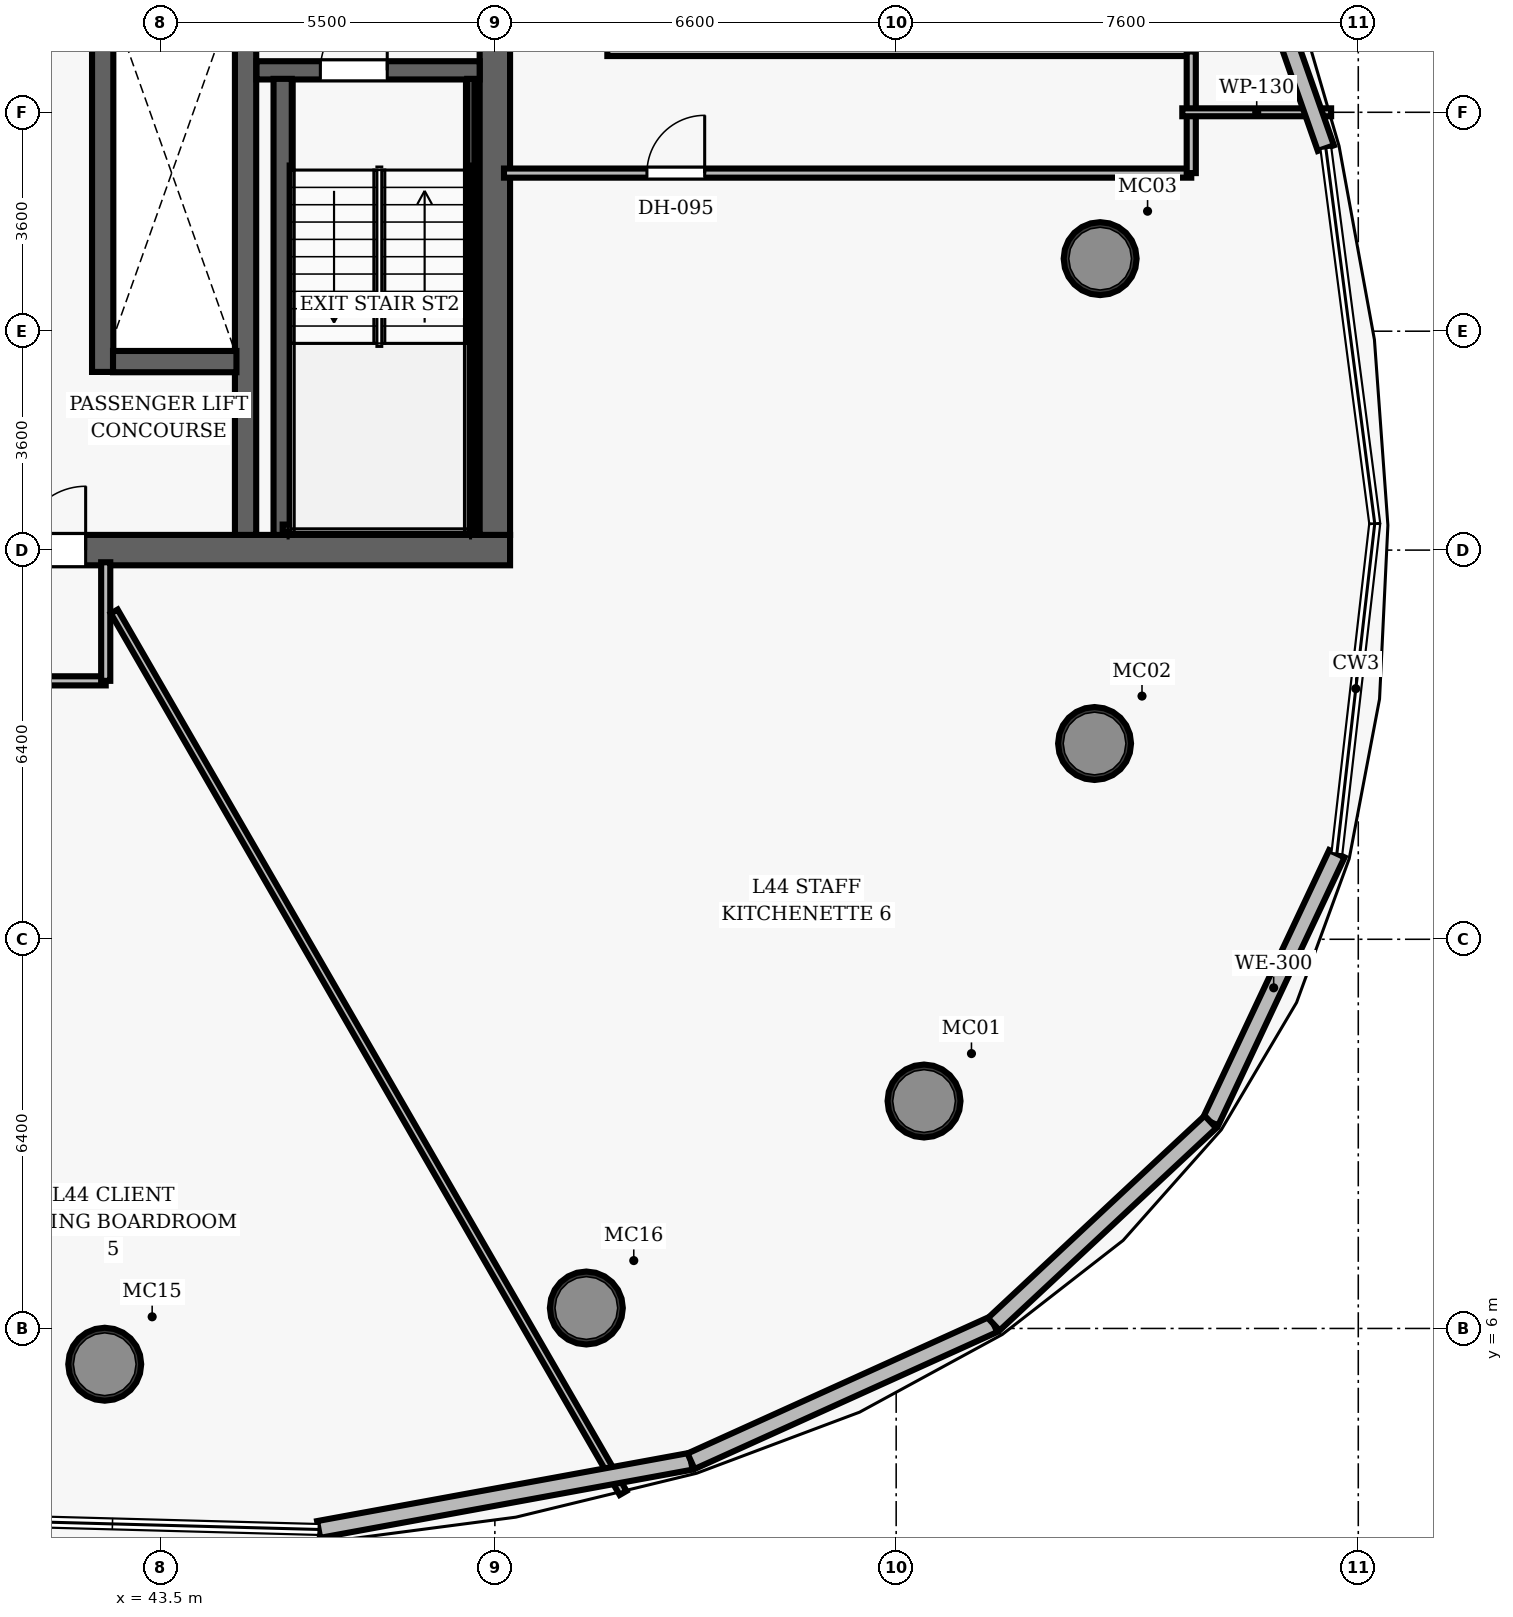
"""IFC4 building model, lengths in metres.
Left out: names, types, materials, properties, quantities, classifications, styles, units other than length and angle.
Written with IfcOpenShell. Run it as: python <this file> out.ifc"""

import sys

from ifc_helpers import new_model, si_unit, direction, frame, frame_2d, origin, origin_2d, place, context, subcontext, project, spatial, rectangle, hollow_circle, extrude, element, fill, save


model = new_model("IFC4")
c1 = context("Model", 3, precision=1e-05, world=origin(), true_north=direction((0.0, 1.0)))
c2 = subcontext(c1, "Body", "Model", "MODEL_VIEW")
j1 = project(units=[si_unit("LENGTHUNIT", "METRE"), si_unit("PLANEANGLEUNIT", "RADIAN")], contexts=[c1])
p1 = place(None, origin())
s1 = spatial("IfcSite", under=j1, at=p1, CompositionType="ELEMENT")
p2 = place(p1, origin())
s2 = spatial("IfcBuilding", under=s1, at=p2, CompositionType="ELEMENT")
p3 = place(p2, frame((0.0, 0.0, 175.05)))
s3 = spatial("IfcBuildingStorey", under=s2, at=p3, CompositionType="ELEMENT", Elevation=175.05)
p4 = place(p3, frame((26.75, 18.8, 0.0), z_axis=(0.0, 0.0, 1.0), x_axis=(1.0, 0.0, 0.0)))
e1 = element("IfcWall", 1, at=p4, inside=s3, PredefinedType="SHEAR", context=c2, shape_type="SweptSolid", body=[
    extrude(rectangle(XDim=22.5, YDim=0.5, at=frame_2d((11.25, 0.0))), origin(), (0.0, 0.0, 1.0), 3.85),
])
p5 = place(p4, frame((14.47, 0.0, 0.0)))
e2 = element("IfcOpeningElement", 2, at=p5, cuts=e1, PredefinedType="OPENING", context=c2, shape_type="SweptSolid", body=[
    extrude(rectangle(XDim=1.05, YDim=2.15, at=frame_2d((0.525, 1.075))), frame((0.0, 0.26, 0.0), z_axis=(0.0, -1.0, 0.0), x_axis=(1.0, 0.0, 0.0)), (0.0, 0.0, 1.0), 0.52),
])
p6 = place(p3, frame((49.0, 19.05, 0.0), z_axis=(0.0, 0.0, 1.0), x_axis=(0.0, 1.0, 0.0)))
e3 = element("IfcWall", 3, at=p6, inside=s3, PredefinedType="SHEAR", context=c2, shape_type="SweptSolid", body=[
    extrude(rectangle(XDim=13.9, YDim=0.5, at=frame_2d((6.95, 0.0))), origin(), (0.0, 0.0, 1.0), 3.85),
])
p7 = place(p6, frame((8.2, 0.0, 0.0)))
e4 = element("IfcOpeningElement", 4, at=p7, cuts=e3, PredefinedType="OPENING", context=c2, shape_type="SweptSolid", body=[
    extrude(rectangle(XDim=1.05, YDim=2.15, at=frame_2d((0.525, 1.075))), frame((0.0, 0.26, 0.0), z_axis=(0.0, -1.0, 0.0), x_axis=(1.0, 0.0, 0.0)), (0.0, 0.0, 1.0), 0.52),
])
p8 = place(p3, frame((44.9, 19.05, 0.0), z_axis=(0.0, 0.0, 1.0), x_axis=(0.0, 1.0, 0.0)))
e5 = element("IfcWall", 5, at=p8, inside=s3, PredefinedType="SHEAR", context=c2, shape_type="SweptSolid", body=[
    extrude(rectangle(XDim=13.9, YDim=0.35, at=frame_2d((6.95, 0.0))), origin(), (0.0, 0.0, 1.0), 3.85),
])
for number, where, z_axis, x_axis in (
    (6, (56.058, 9.74, 0.0), (0.0, 0.0, 1.0), (1.0, 0.0, 0.0)),
    (7, (58.863, 15.619, 0.0), (0.0, 0.0, 1.0), (1.0, 0.0, 0.0)),
    (8, (58.955, 23.594, 0.0), (0.0, 0.0, 1.0), (1.0, 0.0, 0.0)),
    (9, (42.584, 5.412, 0.0), (0.0, 0.0, 1.0), (1.0, 0.0, 0.0)),
    (10, (50.504, 6.336, 0.0), (0.0, 0.0, 1.0), (1.0, 0.0, 0.0)),
):
    element("IfcColumn", number, at=place(p3, frame(where, z_axis=z_axis, x_axis=x_axis)), inside=s3, PredefinedType="COLUMN", context=c2, shape_type="SweptSolid", body=[
        extrude(hollow_circle(Radius=0.6, WallThickness=0.05, at=origin_2d()), origin(), (0.0, 0.0, 1.0), 3.85),
    ])
p9 = place(p3, frame((45.08, 26.69, 0.0), z_axis=(0.0, 0.0, 1.0), x_axis=(1.0, 0.0, 0.0)))
e11 = element("IfcWall", 11, at=p9, inside=s3, PredefinedType="SHEAR", context=c2, shape_type="SweptSolid", body=[
    extrude(rectangle(XDim=3.67, YDim=0.3, at=frame_2d((1.835, 0.0))), origin(), (0.0, 0.0, 1.0), 3.85),
])
p10 = place(p9, frame((1.05, 0.0, 0.0)))
e12 = element("IfcOpeningElement", 12, at=p10, cuts=e11, PredefinedType="OPENING", context=c2, shape_type="SweptSolid", body=[
    extrude(rectangle(XDim=1.1, YDim=2.15, at=frame_2d((0.55, 1.075))), frame((0.0, 0.16, 0.0), z_axis=(0.0, -1.0, 0.0), x_axis=(1.0, 0.0, 0.0)), (0.0, 0.0, 1.0), 0.32),
])
p11 = place(p3, frame((45.51, 19.05, 0.0), z_axis=(0.0, 0.0, 1.0), x_axis=(0.0, 1.0, 0.0)))
e13 = element("IfcWall", 13, at=p11, inside=s3, PredefinedType="SHEAR", context=c2, shape_type="SweptSolid", body=[
    extrude(rectangle(XDim=7.5, YDim=0.3, at=frame_2d((3.75, 0.0))), origin(), (0.0, 0.0, 1.0), 3.85),
])
p12 = place(p3, frame((48.605, 19.1, 0.0), z_axis=(0.0, 0.0, 1.0), x_axis=(0.0, 1.0, 0.0)))
e14 = element("IfcWall", 14, at=p12, inside=s3, PredefinedType="SHEAR", context=c2, shape_type="SweptSolid", body=[
    extrude(rectangle(XDim=7.45, YDim=0.12, at=frame_2d((3.725, 0.0))), origin(), (0.0, 0.0, 1.0), 3.85),
])
p13 = place(p3, frame((45.51, 19.16, 0.0), z_axis=(0.0, 0.0, 1.0), x_axis=(1.0, 0.0, 0.0)))
e15 = element("IfcWall", 15, at=p13, inside=s3, PredefinedType="SHEAR", context=c2, shape_type="SweptSolid", body=[
    extrude(rectangle(XDim=3.095, YDim=0.12, at=frame_2d((1.547, 0.0))), origin(), (0.0, 0.0, 1.0), 3.85),
])
p14 = place(p3, frame((42.55, 21.73, 0.0), z_axis=(0.0, 0.0, 1.0), x_axis=(0.0, 1.0, 0.0)))
e16 = element("IfcWall", 16, at=p14, inside=s3, PredefinedType="SHEAR", context=c2, shape_type="SweptSolid", body=[
    extrude(rectangle(XDim=6.54, YDim=0.35, at=frame_2d((3.27, 0.0))), origin(), (0.0, 0.0, 1.0), 3.035),
])
p15 = place(p3, frame((42.72, 21.9, 0.0), z_axis=(0.0, 0.0, 1.0), x_axis=(1.0, 0.0, 0.0)))
e17 = element("IfcWall", 17, at=p15, inside=s3, PredefinedType="SHEAR", context=c2, shape_type="SweptSolid", body=[
    extrude(rectangle(XDim=2.03, YDim=0.35, at=frame_2d((1.015, 0.0))), origin(), (0.0, 0.0, 1.0), 3.035),
])
p16 = place(p3, frame((50.85, 27.0, 0.0), z_axis=(0.0, 0.0, 1.0), x_axis=(1.0, 0.0, 0.0)))
e18 = element("IfcWall", 18, at=p16, inside=s3, PredefinedType="PARTITIONING", context=c2, shape_type="SweptSolid", body=[
    extrude(rectangle(XDim=9.603, YDim=0.15, at=frame_2d((4.802, 0.0))), origin(), (0.0, 0.0, 1.0), 3.035),
])
p17 = place(p3, frame((49.15, 25.0, 0.0), z_axis=(0.0, 0.0, 1.0), x_axis=(1.0, 0.0, 0.0)))
e19 = element("IfcWall", 19, at=p17, inside=s3, PredefinedType="PARTITIONING", context=c2, shape_type="SweptSolid", body=[
    extrude(rectangle(XDim=11.303, YDim=0.15, at=frame_2d((5.652, 0.0))), origin(), (0.0, 0.0, 1.0), 3.035),
])
p18 = place(p17, frame((2.351, 0.0, 0.0)))
e20 = element("IfcOpeningElement", 20, at=p18, cuts=e19, PredefinedType="OPENING", context=c2, shape_type="SweptSolid", body=[
    extrude(rectangle(XDim=0.95, YDim=2.15, at=frame_2d((0.475, 1.075))), frame((0.0, 0.085, 0.0), z_axis=(0.0, -1.0, 0.0), x_axis=(1.0, 0.0, 0.0)), (0.0, 0.0, 1.0), 0.17),
])
p19 = place(p3, frame((60.453, 25.0, 0.0), z_axis=(0.0, 0.0, 1.0), x_axis=(0.0, 1.0, 0.0)))
e21 = element("IfcWall", 21, at=p19, inside=s3, PredefinedType="PARTITIONING", context=c2, shape_type="SweptSolid", body=[
    extrude(rectangle(XDim=2.0, YDim=0.15, at=frame_2d((1.0, 0.0))), origin(), (0.0, 0.0, 1.0), 3.035),
])
p20 = place(p3, frame((39.05, 16.65, 0.0), z_axis=(0.0, 0.0, 1.0), x_axis=(1.0, 0.0, 0.0)))
e22 = element("IfcWall", 22, at=p20, inside=s3, PredefinedType="PARTITIONING", context=c2, shape_type="SweptSolid", body=[
    extrude(rectangle(XDim=3.55, YDim=0.15, at=frame_2d((1.775, 0.0))), origin(), (0.0, 0.0, 1.0), 3.035),
])
p21 = place(p3, frame((42.6, 16.65, 0.0), z_axis=(0.0, 0.0, 1.0), x_axis=(0.0, 1.0, 0.0)))
e23 = element("IfcWall", 23, at=p21, inside=s3, PredefinedType="PARTITIONING", context=c2, shape_type="SweptSolid", body=[
    extrude(rectangle(XDim=1.95, YDim=0.15, at=frame_2d((0.975, 0.0))), origin(), (0.0, 0.0, 1.0), 3.035),
])
p22 = place(p3, frame((60.306, 26.0, 0.0), z_axis=(0.0, 0.0, 1.0), x_axis=(1.0, 0.0, 0.0)))
e24 = element("IfcWall", 24, at=p22, inside=s3, PredefinedType="PARTITIONING", context=c2, shape_type="SweptSolid", body=[
    extrude(rectangle(XDim=2.448, YDim=0.13, at=frame_2d((1.224, 0.0))), origin(), (0.0, 0.0, 1.0), 3.035),
])
p23 = place(p3, frame((42.74, 17.79, 0.0), z_axis=(0.0, 0.0, 1.0), x_axis=(0.4999998082, -0.86602551452, 0.0)))
e25 = element("IfcWall", 25, at=p23, inside=s3, PredefinedType="PARTITIONING", context=c2, shape_type="SweptSolid", body=[
    extrude(rectangle(XDim=16.738, YDim=0.13, at=frame_2d((8.369, 0.0))), origin(), (0.0, 0.0, 1.0), 3.035),
])
p24 = place(p3, frame((62.848, 13.807, 0.0), z_axis=(0.0, 0.0, 1.0), x_axis=(-0.426284044229, -0.904589361885, 0.0)))
e26 = element("IfcWall", 26, at=p24, inside=s3, PredefinedType="SOLIDWALL", context=c2, shape_type="SweptSolid", body=[
    extrude(rectangle(XDim=4.876, YDim=0.28, at=frame_2d((2.438, 0.0))), origin(), (0.0, 0.0, 1.0), 3.62),
])
p25 = place(p3, frame((60.419, 31.812, 0.0), z_axis=(0.0, 0.0, 1.0), x_axis=(0.331279949487, -0.94353250875, 0.0)))
e27 = element("IfcWall", 27, at=p25, inside=s3, PredefinedType="SOLIDWALL", context=c2, shape_type="SweptSolid", body=[
    extrude(rectangle(XDim=6.784, YDim=0.28, at=frame_2d((3.392, 0.0))), origin(), (0.0, 0.0, 1.0), 3.62),
])
p26 = place(p3, frame((52.226, 3.816, 0.0), z_axis=(0.0, 0.0, 1.0), x_axis=(-0.98364200826, -0.180134393125, 0.0)))
e28 = element("IfcWall", 28, at=p26, inside=s3, PredefinedType="SOLIDWALL", context=c2, shape_type="SweptSolid", body=[
    extrude(rectangle(XDim=6.226, YDim=0.28, at=frame_2d((3.113, 0.0))), origin(), (0.0, 0.0, 1.0), 3.62),
])
p27 = place(p3, frame((57.205, 6.069, 0.0), z_axis=(0.0, 0.0, 1.0), x_axis=(-0.911056784124, -0.41228089466, 0.0)))
e29 = element("IfcWall", 29, at=p27, inside=s3, PredefinedType="SOLIDWALL", context=c2, shape_type="SweptSolid", body=[
    extrude(rectangle(XDim=5.465, YDim=0.28, at=frame_2d((2.732, 0.0))), origin(), (0.0, 0.0, 1.0), 3.62),
])
p28 = place(p3, frame((60.769, 9.396, 0.0), z_axis=(0.0, 0.0, 1.0), x_axis=(-0.730972016713, -0.68240743752, 0.0)))
e30 = element("IfcWall", 30, at=p28, inside=s3, PredefinedType="SOLIDWALL", context=c2, shape_type="SweptSolid", body=[
    extrude(rectangle(XDim=4.876, YDim=0.28, at=frame_2d((2.438, 0.0))), origin(), (0.0, 0.0, 1.0), 3.62),
])
p29 = place(p10, origin())
e31 = element("IfcDoor", 31, at=p29, inside=s3, OperationType="SINGLE_SWING_RIGHT", PredefinedType="DOOR", context=c2, shape_type="SweptSolid", body=[
    extrude(rectangle(XDim=1.1, YDim=2.15, at=frame_2d((0.55, 1.075))), frame((0.0, 0.025, 0.0), z_axis=(0.0, -1.0, 0.0), x_axis=(1.0, 0.0, 0.0)), (0.0, 0.0, 1.0), 0.05),
])
fill(e12, e31)
p30 = place(p5, origin())
e32 = element("IfcDoor", 32, at=p30, inside=s3, OperationType="SINGLE_SWING_RIGHT", PredefinedType="DOOR", context=c2, shape_type="SweptSolid", body=[
    extrude(rectangle(XDim=1.05, YDim=2.15, at=frame_2d((0.525, 1.075))), frame((0.0, 0.025, 0.0), z_axis=(0.0, -1.0, 0.0), x_axis=(1.0, 0.0, 0.0)), (0.0, 0.0, 1.0), 0.05),
])
fill(e2, e32)
p31 = place(p18, origin())
e33 = element("IfcDoor", 33, at=p31, inside=s3, OperationType="SINGLE_SWING_RIGHT", PredefinedType="DOOR", context=c2, shape_type="SweptSolid", body=[
    extrude(rectangle(XDim=0.95, YDim=2.15, at=frame_2d((0.475, 1.075))), frame((0.0, 0.025, 0.0), z_axis=(0.0, -1.0, 0.0), x_axis=(1.0, 0.0, 0.0)), (0.0, 0.0, 1.0), 0.05),
])
fill(e20, e33)
save(model, sys.argv[1])
